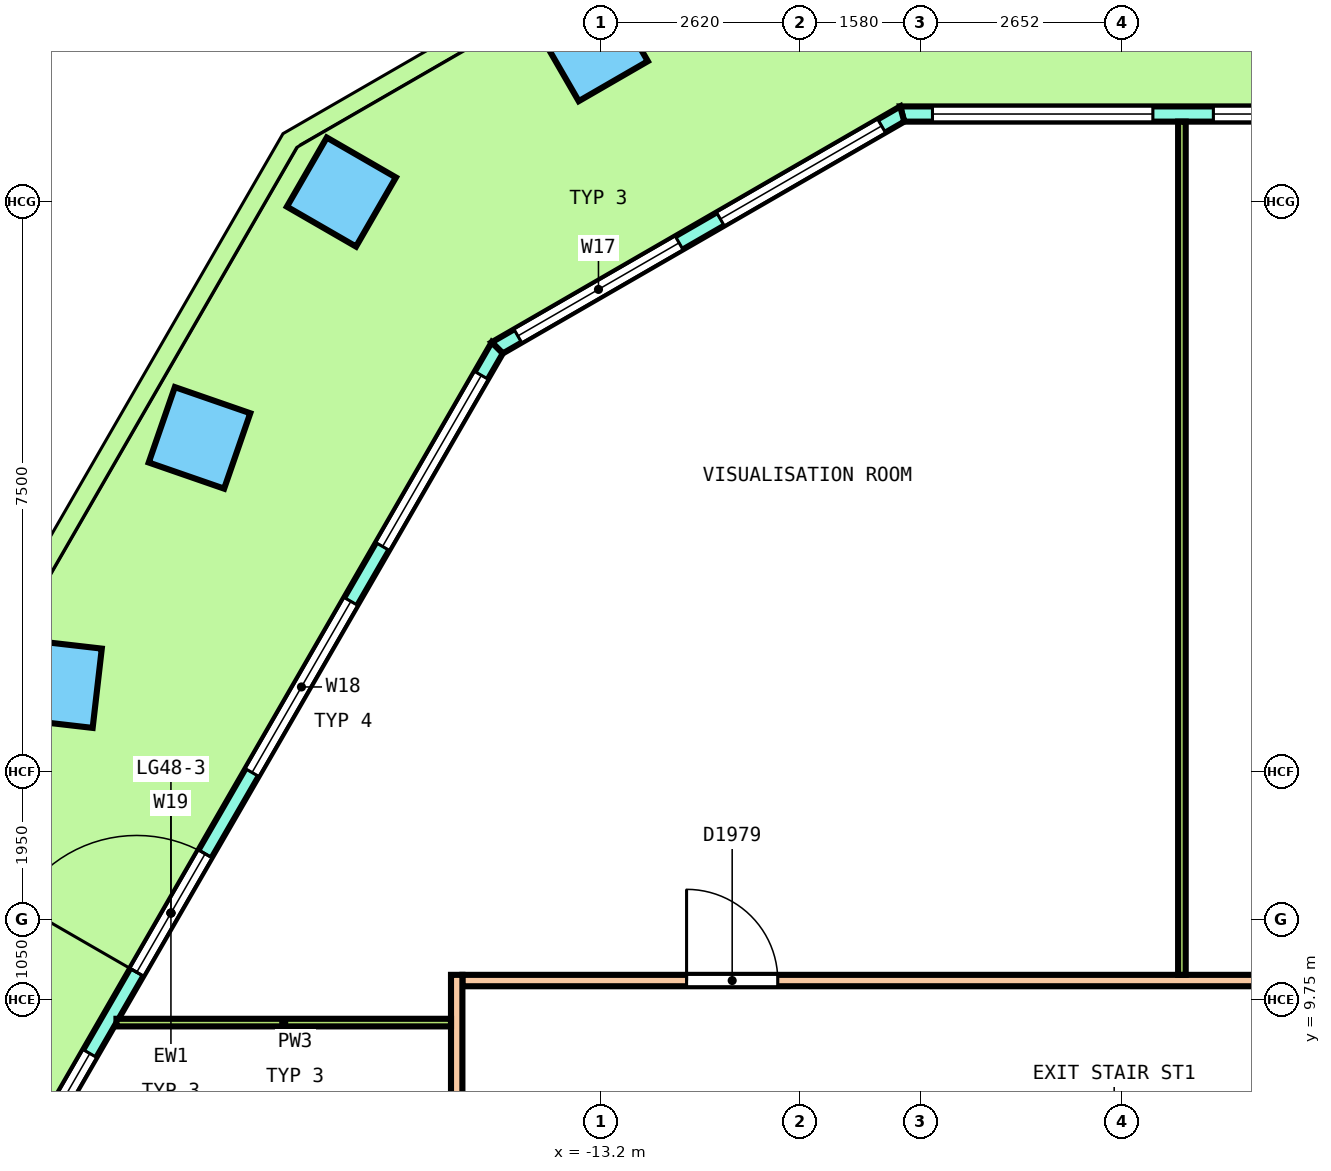
"""IFC4 building model, lengths in metres.
Left out: names, types, materials, properties, quantities, classifications, styles, units other than length and angle.
Written with IfcOpenShell. Run it as: python <this file> out.ifc"""

import sys

from ifc_helpers import new_model, si_unit, direction, frame, frame_2d, origin, origin_2d, place, context, subcontext, project, spatial, polyline, rectangle, outline, extrude, element, fill, save


model = new_model("IFC4")
c1 = context("Model", 3, precision=1e-05, world=origin(), true_north=direction((0.0, 1.0)))
c2 = subcontext(c1, "Body", "Model", "MODEL_VIEW")
j1 = project(units=[si_unit("LENGTHUNIT", "METRE"), si_unit("PLANEANGLEUNIT", "RADIAN")], contexts=[c1])
p1 = place(None, origin())
s1 = spatial("IfcSite", under=j1, at=p1, CompositionType="ELEMENT")
p2 = place(p1, origin())
s2 = spatial("IfcBuilding", under=s1, at=p2, CompositionType="ELEMENT")
p3 = place(p2, frame((0.0, 0.0, 223.4)))
s3 = spatial("IfcBuildingStorey", under=s2, at=p3, CompositionType="ELEMENT", Elevation=223.4)
for number, where, z_axis, x_axis in (
    (1, (-13.303, 22.287, 0.0), (-0.036, 0.0, 0.999), (-0.865, -0.5, -0.031)),
    (2, (-16.617, 20.373, 0.0), (-0.036, 0.0, 0.999), (-0.499, -0.866, -0.018)),
):
    element("IfcColumn", number, at=place(p3, frame(where, z_axis=z_axis, x_axis=x_axis)), inside=s3, PredefinedType="COLUMN", context=c2, shape_type="SweptSolid", body=[
        extrude(rectangle(XDim=1.05, YDim=1.05, at=origin_2d()), origin(), (0.0, 0.0, 1.0), 3.653),
    ])
p4 = place(p3, frame((-18.484, 17.139, 0.0), z_axis=(-0.032621940247, 0.006283734392, 0.999448009502), x_axis=(-0.500036322924, -0.865936123493, -0.010876846363)))
e3 = element("IfcColumn", 3, at=p4, inside=s3, PredefinedType="COLUMN", context=c2, shape_type="SweptSolid", body=[
    extrude(rectangle(XDim=1.05, YDim=1.05, at=origin_2d()), origin(), (0.0, 0.0, 1.0), 3.652),
])
p5 = place(p3, frame((-20.351, 13.906, 0.0), z_axis=(-0.029013644583, 0.012568122538, 0.999500000362), x_axis=(-0.499848973822, -0.866105020579, -0.003618935909)))
e4 = element("IfcColumn", 4, at=p5, inside=s3, PredefinedType="COLUMN", context=c2, shape_type="SweptSolid", body=[
    extrude(rectangle(XDim=1.05, YDim=1.05, at=origin_2d()), origin(), (0.0, 0.0, 1.0), 3.652),
])
p6 = place(p3, frame((9.238, 21.4, 0.0), z_axis=(0.0, 0.0, 1.0), x_axis=(-1.0, 0.0, 0.0)))
e5 = element("IfcWall", 5, at=p6, inside=s3, PredefinedType="SOLIDWALL", context=c2, shape_type="SweptSolid", body=[
    extrude(outline(polyline([(-0.027, -0.1), (1.003, -0.1), (2.032, -0.1), (3.062, -0.1), (4.091, -0.1), (5.12, -0.1), (6.15, -0.1), (7.179, -0.1), (8.209, -0.1), (9.238, -0.1), (10.268, -0.1), (11.297, -0.1), (12.327, -0.1), (13.356, -0.1), (14.385, -0.1), (15.415, -0.1), (16.445, -0.1), (17.474, -0.1), (18.503, -0.1), (18.45, 0.1), (17.426, 0.1), (16.403, 0.1), (15.379, 0.1), (14.356, 0.1), (13.332, 0.1), (12.309, 0.1), (11.285, 0.1), (10.262, 0.1), (9.238, 0.1), (8.215, 0.1), (7.191, 0.1), (6.168, 0.1), (5.144, 0.1), (4.121, 0.1), (3.097, 0.1), (2.074, 0.1), (1.05, 0.1), (0.027, 0.1), (-0.027, -0.1)])), origin(), (0.0, 0.0, 1.0), 3.7),
])
p7 = place(p6, frame((0.398, 0.0, 0.1)))
e6 = element("IfcOpeningElement", 6, at=p7, cuts=e5, PredefinedType="OPENING", context=c2, shape_type="SweptSolid", body=[
    extrude(rectangle(XDim=2.9, YDim=2.65, at=frame_2d((1.45, 1.325))), frame((0.0, 0.11, 0.0), z_axis=(0.0, -1.0, 0.0), x_axis=(1.0, 0.0, 0.0)), (0.0, 0.0, 1.0), 0.22),
])
p8 = place(p6, frame((4.093, 0.0, 0.1)))
e7 = element("IfcOpeningElement", 7, at=p8, cuts=e5, PredefinedType="OPENING", context=c2, shape_type="SweptSolid", body=[
    extrude(rectangle(XDim=2.9, YDim=2.65, at=frame_2d((1.45, 1.325))), frame((0.0, 0.11, 0.0), z_axis=(0.0, -1.0, 0.0), x_axis=(1.0, 0.0, 0.0)), (0.0, 0.0, 1.0), 0.22),
])
p9 = place(p6, frame((8.338, 0.0, 0.0)))
e8 = element("IfcOpeningElement", 8, at=p9, cuts=e5, PredefinedType="OPENING", context=c2, shape_type="SweptSolid", body=[
    extrude(rectangle(XDim=1.8, YDim=2.4, at=frame_2d((0.9, 1.2))), frame((0.0, 0.11, 0.0), z_axis=(0.0, -1.0, 0.0), x_axis=(1.0, 0.0, 0.0)), (0.0, 0.0, 1.0), 0.22),
])
p10 = place(p6, frame((8.338, 0.0, 2.55)))
e9 = element("IfcOpeningElement", 9, at=p10, cuts=e5, PredefinedType="OPENING", context=c2, shape_type="SweptSolid", body=[
    extrude(rectangle(XDim=1.8, YDim=0.2, at=frame_2d((0.9, 0.1))), frame((0.0, 0.11, 0.0), z_axis=(0.0, -1.0, 0.0), x_axis=(1.0, 0.0, 0.0)), (0.0, 0.0, 1.0), 0.22),
])
p11 = place(p6, frame((11.484, 0.0, 0.1)))
e10 = element("IfcOpeningElement", 10, at=p11, cuts=e5, PredefinedType="OPENING", context=c2, shape_type="SweptSolid", body=[
    extrude(rectangle(XDim=2.9, YDim=2.65, at=frame_2d((1.45, 1.325))), frame((0.0, 0.11, 0.0), z_axis=(0.0, -1.0, 0.0), x_axis=(1.0, 0.0, 0.0)), (0.0, 0.0, 1.0), 0.22),
])
p12 = place(p6, frame((15.179, 0.0, 0.1)))
e11 = element("IfcOpeningElement", 11, at=p12, cuts=e5, PredefinedType="OPENING", context=c2, shape_type="SweptSolid", body=[
    extrude(rectangle(XDim=2.9, YDim=2.65, at=frame_2d((1.45, 1.325))), frame((0.0, 0.11, 0.0), z_axis=(0.0, -1.0, 0.0), x_axis=(1.0, 0.0, 0.0)), (0.0, 0.0, 1.0), 0.22),
])
p13 = place(p3, frame((-9.238, 21.4, 0.0), z_axis=(0.0, 0.0, 1.0), x_axis=(-0.866029647142, -0.499992650217, 0.0)))
e12 = element("IfcWall", 12, at=p13, inside=s3, PredefinedType="SOLIDWALL", context=c2, shape_type="SweptSolid", body=[
    extrude(outline(polyline([(-0.027, -0.1), (1.008, -0.1), (2.042, -0.1), (3.076, -0.1), (4.111, -0.1), (5.145, -0.1), (6.18, -0.1), (6.126, 0.1), (5.109, 0.1), (4.093, 0.1), (3.076, 0.1), (2.06, 0.1), (1.043, 0.1), (0.027, 0.1), (-0.027, -0.1)])), origin(), (0.0, 0.0, 1.0), 3.7),
])
p14 = place(p13, frame((0.313, 0.0, 0.1)))
e13 = element("IfcOpeningElement", 13, at=p14, cuts=e12, PredefinedType="OPENING", context=c2, shape_type="SweptSolid", body=[
    extrude(rectangle(XDim=2.45, YDim=2.65, at=frame_2d((1.225, 1.325))), frame((0.0, 0.11, 0.0), z_axis=(0.0, -1.0, 0.0), x_axis=(1.0, 0.0, 0.0)), (0.0, 0.0, 1.0), 0.22),
])
p15 = place(p13, frame((3.39, 0.0, 0.1)))
e14 = element("IfcOpeningElement", 14, at=p15, cuts=e12, PredefinedType="OPENING", context=c2, shape_type="SweptSolid", body=[
    extrude(rectangle(XDim=2.45, YDim=2.65, at=frame_2d((1.225, 1.325))), frame((0.0, 0.11, 0.0), z_axis=(0.0, -1.0, 0.0), x_axis=(1.0, 0.0, 0.0)), (0.0, 0.0, 1.0), 0.22),
])
p16 = place(p3, frame((-14.567, 18.323, 0.0), z_axis=(0.0, 0.0, 1.0), x_axis=(-0.5000034888, -0.866023389516, 0.0)))
e15 = element("IfcWall", 15, at=p16, inside=s3, PredefinedType="SOLIDWALL", context=c2, shape_type="SweptSolid", body=[
    extrude(outline(polyline([(-0.027, -0.1), (0.986, -0.1), (2.0, -0.1), (3.013, -0.1), (4.026, -0.1), (5.039, -0.1), (6.052, -0.1), (7.065, -0.1), (8.079, -0.1), (9.092, -0.1), (10.105, -0.1), (11.118, -0.1), (12.131, -0.1), (13.145, -0.1), (14.158, -0.1), (15.171, -0.1), (16.184, -0.1), (17.197, -0.1), (17.144, 0.1), (16.137, 0.1), (15.13, 0.1), (14.123, 0.1), (13.116, 0.1), (12.109, 0.1), (11.102, 0.1), (10.095, 0.1), (9.089, 0.1), (8.082, 0.1), (7.075, 0.1), (6.068, 0.1), (5.061, 0.1), (4.054, 0.1), (3.047, 0.1), (2.041, 0.1), (1.034, 0.1), (0.027, 0.1), (-0.027, -0.1)])), origin(), (0.0, 0.0, 1.0), 3.7),
])
p17 = place(p16, frame((0.417, 0.0, 0.1)))
e16 = element("IfcOpeningElement", 16, at=p17, cuts=e15, PredefinedType="OPENING", context=c2, shape_type="SweptSolid", body=[
    extrude(rectangle(XDim=2.6, YDim=2.65, at=frame_2d((1.3, 1.325))), frame((0.0, 0.11, 0.0), z_axis=(0.0, -1.0, 0.0), x_axis=(1.0, 0.0, 0.0)), (0.0, 0.0, 1.0), 0.22),
])
p18 = place(p16, frame((3.851, 0.0, 0.1)))
e17 = element("IfcOpeningElement", 17, at=p18, cuts=e15, PredefinedType="OPENING", context=c2, shape_type="SweptSolid", body=[
    extrude(rectangle(XDim=2.6, YDim=2.65, at=frame_2d((1.3, 1.325))), frame((0.0, 0.11, 0.0), z_axis=(0.0, -1.0, 0.0), x_axis=(1.0, 0.0, 0.0)), (0.0, 0.0, 1.0), 0.22),
])
p19 = place(p16, frame((7.685, 0.0, 0.0)))
e18 = element("IfcOpeningElement", 18, at=p19, cuts=e15, PredefinedType="OPENING", context=c2, shape_type="SweptSolid", body=[
    extrude(rectangle(XDim=1.8, YDim=2.4, at=frame_2d((0.9, 1.2))), frame((0.0, 0.11, 0.0), z_axis=(0.0, -1.0, 0.0), x_axis=(1.0, 0.0, 0.0)), (0.0, 0.0, 1.0), 0.22),
])
p20 = place(p16, frame((7.685, 0.0, 2.55)))
e19 = element("IfcOpeningElement", 19, at=p20, cuts=e15, PredefinedType="OPENING", context=c2, shape_type="SweptSolid", body=[
    extrude(rectangle(XDim=1.8, YDim=0.2, at=frame_2d((0.9, 0.1))), frame((0.0, 0.11, 0.0), z_axis=(0.0, -1.0, 0.0), x_axis=(1.0, 0.0, 0.0)), (0.0, 0.0, 1.0), 0.22),
])
p21 = place(p16, frame((10.719, 0.0, 0.1)))
e20 = element("IfcOpeningElement", 20, at=p21, cuts=e15, PredefinedType="OPENING", context=c2, shape_type="SweptSolid", body=[
    extrude(rectangle(XDim=2.6, YDim=2.65, at=frame_2d((1.3, 1.325))), frame((0.0, 0.11, 0.0), z_axis=(0.0, -1.0, 0.0), x_axis=(1.0, 0.0, 0.0)), (0.0, 0.0, 1.0), 0.22),
])
p22 = place(p16, frame((14.153, 0.0, 0.1)))
e21 = element("IfcOpeningElement", 21, at=p22, cuts=e15, PredefinedType="OPENING", context=c2, shape_type="SweptSolid", body=[
    extrude(rectangle(XDim=2.6, YDim=2.65, at=frame_2d((1.3, 1.325))), frame((0.0, 0.11, 0.0), z_axis=(0.0, -1.0, 0.0), x_axis=(1.0, 0.0, 0.0)), (0.0, 0.0, 1.0), 0.22),
])
p23 = place(p3, frame((-15.025, 10.0, 0.0), z_axis=(0.0, 0.0, 1.0), x_axis=(1.0, 0.0, 0.0)))
e22 = element("IfcWall", 22, at=p23, inside=s3, PredefinedType="PARTITIONING", context=c2, shape_type="SweptSolid", body=[
    extrude(rectangle(XDim=30.075, YDim=0.15, at=frame_2d((15.038, 0.0))), origin(), (0.0, 0.0, 1.0), 2.8),
])
p24 = place(p23, frame((25.509, 0.0, 0.0)))
e23 = element("IfcOpeningElement", 23, at=p24, cuts=e22, PredefinedType="OPENING", context=c2, shape_type="SweptSolid", body=[
    extrude(rectangle(XDim=1.2, YDim=2.1, at=frame_2d((0.6, 1.05))), frame((0.0, 0.085, 0.0), z_axis=(0.0, -1.0, 0.0), x_axis=(1.0, 0.0, 0.0)), (0.0, 0.0, 1.0), 0.17),
])
p25 = place(p23, frame((14.409, 0.0, 0.0)))
e24 = element("IfcOpeningElement", 24, at=p25, cuts=e22, PredefinedType="OPENING", context=c2, shape_type="SweptSolid", body=[
    extrude(rectangle(XDim=1.0, YDim=2.1, at=frame_2d((0.5, 1.05))), frame((0.0, 0.085, 0.0), z_axis=(0.0, -1.0, 0.0), x_axis=(1.0, 0.0, 0.0)), (0.0, 0.0, 1.0), 0.17),
])
p26 = place(p23, frame((2.949, 0.0, 0.0)))
e25 = element("IfcOpeningElement", 25, at=p26, cuts=e22, PredefinedType="OPENING", context=c2, shape_type="SweptSolid", body=[
    extrude(rectangle(XDim=1.2, YDim=2.1, at=frame_2d((0.6, 1.05))), frame((0.0, 0.085, 0.0), z_axis=(0.0, -1.0, 0.0), x_axis=(1.0, 0.0, 0.0)), (0.0, 0.0, 1.0), 0.17),
])
p27 = place(p3, frame((-15.1, -0.25, 0.0), z_axis=(0.0, 0.0, 1.0), x_axis=(0.0, 1.0, 0.0)))
e26 = element("IfcWall", 26, at=p27, inside=s3, PredefinedType="PARTITIONING", context=c2, shape_type="SweptSolid", body=[
    extrude(rectangle(XDim=10.324, YDim=0.15, at=frame_2d((5.162, 0.0))), origin(), (0.0, 0.0, 1.0), 2.8),
])
p28 = place(p27, frame((5.573, 0.0, 0.0)))
e27 = element("IfcOpeningElement", 27, at=p28, cuts=e26, PredefinedType="OPENING", context=c2, shape_type="SweptSolid", body=[
    extrude(rectangle(XDim=1.0, YDim=2.1, at=frame_2d((0.5, 1.05))), frame((0.0, 0.085, 0.0), z_axis=(0.0, -1.0, 0.0), x_axis=(1.0, 0.0, 0.0)), (0.0, 0.0, 1.0), 0.17),
])
p29 = place(p3, frame((-5.559, 10.075, 0.0), z_axis=(0.0, 0.0, 1.0), x_axis=(0.0, 1.0, 0.0)))
e28 = element("IfcWall", 28, at=p29, inside=s3, PredefinedType="PARTITIONING", context=c2, shape_type="SweptSolid", body=[
    extrude(rectangle(XDim=11.225, YDim=0.1, at=frame_2d((5.613, 0.0))), origin(), (0.0, 0.0, 1.0), 2.8),
])
p30 = place(p3, frame((-19.576, 9.447, 0.0), z_axis=(0.0, 0.0, 1.0), x_axis=(1.0, 0.0, 0.0)))
e29 = element("IfcWall", 29, at=p30, inside=s3, PredefinedType="PARTITIONING", context=c2, shape_type="SweptSolid", body=[
    extrude(rectangle(XDim=4.401, YDim=0.1, at=frame_2d((2.201, 0.0))), origin(), (0.0, 0.0, 1.0), 2.8),
])
p31 = place(p11, origin())
e30 = element("IfcWindow", 30, at=p31, inside=s3, PartitioningType="SINGLE_PANEL", PredefinedType="WINDOW", context=c2, shape_type="SweptSolid", body=[
    extrude(rectangle(XDim=2.9, YDim=2.65, at=frame_2d((1.45, 1.325))), frame((0.0, 0.03, 0.0), z_axis=(0.0, -1.0, 0.0), x_axis=(1.0, 0.0, 0.0)), (0.0, 0.0, 1.0), 0.06),
])
fill(e10, e30)
p32 = place(p12, origin())
e31 = element("IfcWindow", 31, at=p32, inside=s3, PartitioningType="SINGLE_PANEL", PredefinedType="WINDOW", context=c2, shape_type="SweptSolid", body=[
    extrude(rectangle(XDim=2.9, YDim=2.65, at=frame_2d((1.45, 1.325))), frame((0.0, 0.03, 0.0), z_axis=(0.0, -1.0, 0.0), x_axis=(1.0, 0.0, 0.0)), (0.0, 0.0, 1.0), 0.06),
])
fill(e11, e31)
p33 = place(p14, origin())
e32 = element("IfcWindow", 32, at=p33, inside=s3, PartitioningType="SINGLE_PANEL", PredefinedType="WINDOW", context=c2, shape_type="SweptSolid", body=[
    extrude(rectangle(XDim=2.45, YDim=2.65, at=frame_2d((1.225, 1.325))), frame((0.0, 0.03, 0.0), z_axis=(0.0, -1.0, 0.0), x_axis=(1.0, 0.0, 0.0)), (0.0, 0.0, 1.0), 0.06),
])
fill(e13, e32)
p34 = place(p15, origin())
e33 = element("IfcWindow", 33, at=p34, inside=s3, PartitioningType="SINGLE_PANEL", PredefinedType="WINDOW", context=c2, shape_type="SweptSolid", body=[
    extrude(rectangle(XDim=2.45, YDim=2.65, at=frame_2d((1.225, 1.325))), frame((0.0, 0.03, 0.0), z_axis=(0.0, -1.0, 0.0), x_axis=(1.0, 0.0, 0.0)), (0.0, 0.0, 1.0), 0.06),
])
fill(e14, e33)
p35 = place(p17, origin())
e34 = element("IfcWindow", 34, at=p35, inside=s3, PartitioningType="SINGLE_PANEL", PredefinedType="WINDOW", context=c2, shape_type="SweptSolid", body=[
    extrude(rectangle(XDim=2.6, YDim=2.65, at=frame_2d((1.3, 1.325))), frame((0.0, 0.03, 0.0), z_axis=(0.0, -1.0, 0.0), x_axis=(1.0, 0.0, 0.0)), (0.0, 0.0, 1.0), 0.06),
])
fill(e16, e34)
p36 = place(p18, origin())
e35 = element("IfcWindow", 35, at=p36, inside=s3, PartitioningType="SINGLE_PANEL", PredefinedType="WINDOW", context=c2, shape_type="SweptSolid", body=[
    extrude(rectangle(XDim=2.6, YDim=2.65, at=frame_2d((1.3, 1.325))), frame((0.0, 0.03, 0.0), z_axis=(0.0, -1.0, 0.0), x_axis=(1.0, 0.0, 0.0)), (0.0, 0.0, 1.0), 0.06),
])
fill(e17, e35)
p37 = place(p19, origin())
e36 = element("IfcDoor", 36, at=p37, inside=s3, OperationType="DOUBLE_DOOR_SINGLE_SWING", PredefinedType="DOOR", context=c2, shape_type="SweptSolid", body=[
    extrude(rectangle(XDim=1.8, YDim=2.4, at=frame_2d((0.9, 1.2))), frame((0.0, 0.025, 0.0), z_axis=(0.0, -1.0, 0.0), x_axis=(1.0, 0.0, 0.0)), (0.0, 0.0, 1.0), 0.05),
])
fill(e18, e36)
p38 = place(p20, origin())
e37 = element("IfcWindow", 37, at=p38, inside=s3, PartitioningType="SINGLE_PANEL", PredefinedType="WINDOW", context=c2, shape_type="SweptSolid", body=[
    extrude(rectangle(XDim=1.8, YDim=0.2, at=frame_2d((0.9, 0.1))), frame((0.0, 0.03, 0.0), z_axis=(0.0, -1.0, 0.0), x_axis=(1.0, 0.0, 0.0)), (0.0, 0.0, 1.0), 0.06),
])
fill(e19, e37)
p39 = place(p21, origin())
e38 = element("IfcWindow", 38, at=p39, inside=s3, PartitioningType="SINGLE_PANEL", PredefinedType="WINDOW", context=c2, shape_type="SweptSolid", body=[
    extrude(rectangle(XDim=2.6, YDim=2.65, at=frame_2d((1.3, 1.325))), frame((0.0, 0.03, 0.0), z_axis=(0.0, -1.0, 0.0), x_axis=(1.0, 0.0, 0.0)), (0.0, 0.0, 1.0), 0.06),
])
fill(e20, e38)
p40 = place(p26, origin())
e39 = element("IfcDoor", 39, at=p40, inside=s3, OperationType="DOUBLE_DOOR_SINGLE_SWING", PredefinedType="DOOR", context=c2, shape_type="SweptSolid", body=[
    extrude(rectangle(XDim=1.2, YDim=2.1, at=frame_2d((0.6, 1.05))), frame((0.0, 0.025, 0.0), z_axis=(0.0, -1.0, 0.0), x_axis=(1.0, 0.0, 0.0)), (0.0, 0.0, 1.0), 0.05),
])
fill(e25, e39)
save(model, sys.argv[1])
